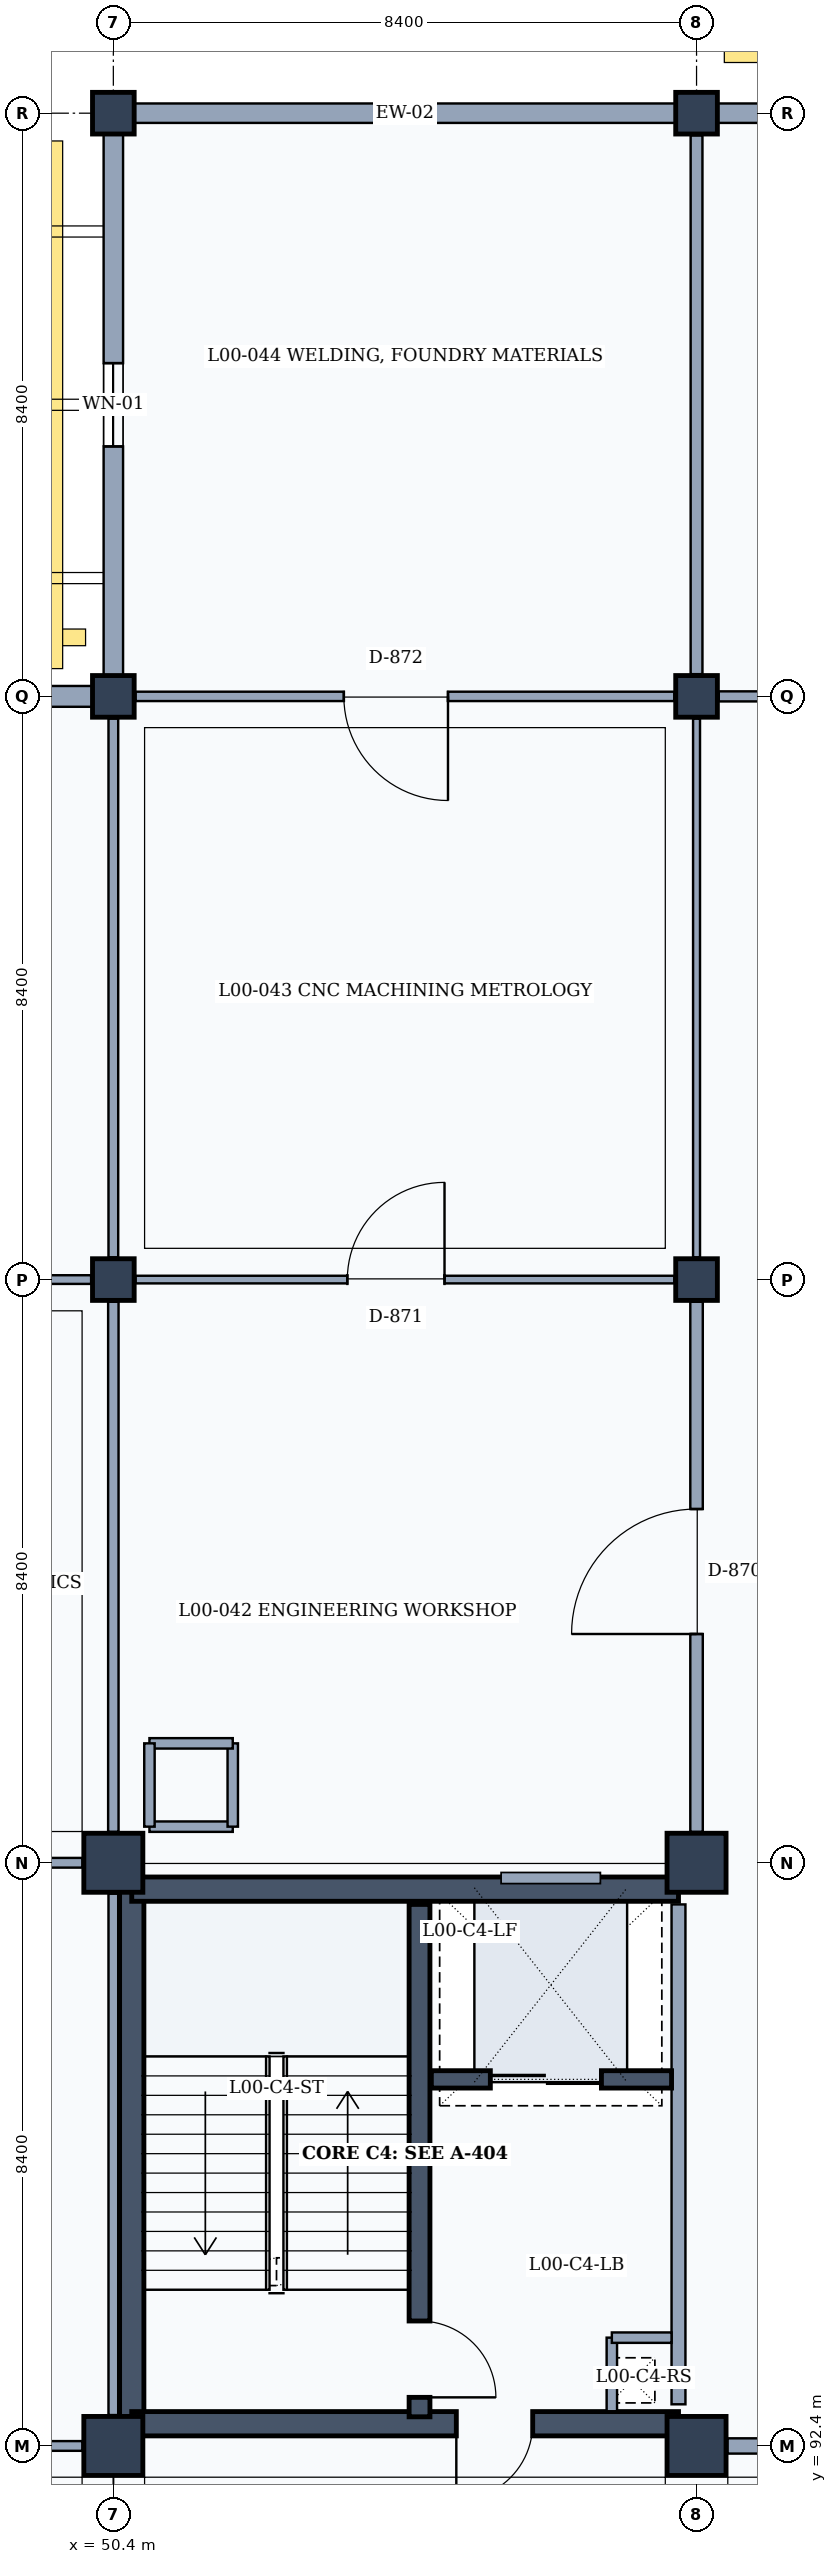
"""IFC4 building model, lengths in metres.
Left out: names, types, materials, properties, quantities, classifications, styles, units other than length and angle.
Written with IfcOpenShell. Run it as: python <this file> out.ifc"""

import sys

from ifc_helpers import new_model, si_unit, direction, frame, frame_2d, origin, origin_2d, place, context, subcontext, project, spatial, rectangle, extrude, element, fill, save


model = new_model("IFC4")
c1 = context("Model", 3, precision=1e-05, world=origin(), true_north=direction((0.0, 1.0)))
c2 = subcontext(c1, "Body", "Model", "MODEL_VIEW")
j1 = project(units=[si_unit("LENGTHUNIT", "METRE"), si_unit("PLANEANGLEUNIT", "RADIAN")], contexts=[c1])
p1 = place(None, origin())
s1 = spatial("IfcSite", under=j1, at=p1, CompositionType="ELEMENT")
p2 = place(p1, origin())
s2 = spatial("IfcBuilding", under=s1, at=p2, CompositionType="ELEMENT")
p3 = place(p2, origin())
s3 = spatial("IfcBuildingStorey", under=s2, at=p3, CompositionType="ELEMENT", Elevation=0.0)
for number, where, z_axis, x_axis in (
    (1, (50.4, 92.4, 0.0), (0.0, 0.0, 1.0), (1.0, 0.0, 0.0)),
    (2, (50.4, 100.8, 0.0), (0.0, 0.0, 1.0), (1.0, 0.0, 0.0)),
):
    element("IfcColumn", number, at=place(p3, frame(where, z_axis=z_axis, x_axis=x_axis)), inside=s3, PredefinedType="COLUMN", context=c2, shape_type="SweptSolid", body=[
        extrude(rectangle(XDim=0.85, YDim=0.85, at=origin_2d()), origin(), (0.0, 0.0, 1.0), 4.8),
    ])
for number, where, z_axis, x_axis in (
    (3, (50.4, 109.2, 0.0), (0.0, 0.0, 1.0), (1.0, 0.0, 0.0)),
    (4, (50.4, 117.6, 0.0), (0.0, 0.0, 1.0), (1.0, 0.0, 0.0)),
    (5, (50.4, 126.0, 0.0), (0.0, 0.0, 1.0), (1.0, 0.0, 0.0)),
):
    element("IfcColumn", number, at=place(p3, frame(where, z_axis=z_axis, x_axis=x_axis)), inside=s3, PredefinedType="COLUMN", context=c2, shape_type="SweptSolid", body=[
        extrude(rectangle(XDim=0.6, YDim=0.6, at=origin_2d()), origin(), (0.0, 0.0, 1.0), 4.8),
    ])
for number, where, z_axis, x_axis in (
    (6, (58.8, 92.4, 0.0), (0.0, 0.0, 1.0), (1.0, 0.0, 0.0)),
    (7, (58.8, 100.8, 0.0), (0.0, 0.0, 1.0), (1.0, 0.0, 0.0)),
):
    element("IfcColumn", number, at=place(p3, frame(where, z_axis=z_axis, x_axis=x_axis)), inside=s3, PredefinedType="COLUMN", context=c2, shape_type="SweptSolid", body=[
        extrude(rectangle(XDim=0.85, YDim=0.85, at=origin_2d()), origin(), (0.0, 0.0, 1.0), 4.8),
    ])
for number, where, z_axis, x_axis in (
    (8, (58.8, 109.2, 0.0), (0.0, 0.0, 1.0), (1.0, 0.0, 0.0)),
    (9, (58.8, 117.6, 0.0), (0.0, 0.0, 1.0), (1.0, 0.0, 0.0)),
    (10, (58.8, 126.0, 0.0), (0.0, 0.0, 1.0), (1.0, 0.0, 0.0)),
):
    element("IfcColumn", number, at=place(p3, frame(where, z_axis=z_axis, x_axis=x_axis)), inside=s3, PredefinedType="COLUMN", context=c2, shape_type="SweptSolid", body=[
        extrude(rectangle(XDim=0.6, YDim=0.6, at=origin_2d()), origin(), (0.0, 0.0, 1.0), 4.8),
    ])
p4 = place(p3, frame((42.25, 117.6, 0.0), z_axis=(0.0, 0.0, 1.0), x_axis=(1.0, 0.0, 0.0)))
e11 = element("IfcWall", 11, at=p4, inside=s3, PredefinedType="SOLIDWALL", context=c2, shape_type="SweptSolid", body=[
    extrude(rectangle(XDim=7.85, YDim=0.3, at=frame_2d((3.925, 0.0))), origin(), (0.0, 0.0, 1.0), 3.96),
])
p5 = place(p4, frame((2.525, 0.0, 0.95)))
e12 = element("IfcOpeningElement", 12, at=p5, cuts=e11, PredefinedType="OPENING", context=c2, shape_type="SweptSolid", body=[
    extrude(rectangle(XDim=2.8, YDim=1.65, at=frame_2d((1.4, 0.825))), frame((0.0, 0.16, 0.0), z_axis=(0.0, -1.0, 0.0), x_axis=(1.0, 0.0, 0.0)), (0.0, 0.0, 1.0), 0.32),
])
p6 = place(p3, frame((50.7, 126.0, 0.0), z_axis=(0.0, 0.0, 1.0), x_axis=(1.0, 0.0, 0.0)))
e13 = element("IfcWall", 13, at=p6, inside=s3, PredefinedType="SOLIDWALL", context=c2, shape_type="SweptSolid", body=[
    extrude(rectangle(XDim=7.8, YDim=0.28, at=frame_2d((3.9, 0.0))), origin(), (0.0, 0.0, 1.0), 3.96),
])
p7 = place(p3, frame((50.4, 117.9, 0.0), z_axis=(0.0, 0.0, 1.0), x_axis=(0.0, 1.0, 0.0)))
e14 = element("IfcWall", 14, at=p7, inside=s3, PredefinedType="SOLIDWALL", context=c2, shape_type="SweptSolid", body=[
    extrude(rectangle(XDim=7.8, YDim=0.28, at=frame_2d((3.9, 0.0))), origin(), (0.0, 0.0, 1.0), 3.96),
])
p8 = place(p7, frame((3.3, 0.0, 0.95)))
e15 = element("IfcOpeningElement", 15, at=p8, cuts=e14, PredefinedType="OPENING", context=c2, shape_type="SweptSolid", body=[
    extrude(rectangle(XDim=1.2, YDim=1.8, at=frame_2d((0.6, 0.9))), frame((0.0, 0.15, 0.0), z_axis=(0.0, -1.0, 0.0), x_axis=(1.0, 0.0, 0.0)), (0.0, 0.0, 1.0), 0.3),
])
p9 = place(p3, frame((59.1, 126.0, 0.0), z_axis=(0.0, 0.0, 1.0), x_axis=(1.0, 0.0, 0.0)))
e16 = element("IfcWall", 16, at=p9, inside=s3, PredefinedType="SOLIDWALL", context=c2, shape_type="SweptSolid", body=[
    extrude(rectangle(XDim=7.8, YDim=0.28, at=frame_2d((3.9, 0.0))), origin(), (0.0, 0.0, 1.0), 3.96),
])
p10 = place(p9, frame((3.1, 0.0, 0.95)))
e17 = element("IfcOpeningElement", 17, at=p10, cuts=e16, PredefinedType="OPENING", context=c2, shape_type="SweptSolid", body=[
    extrude(rectangle(XDim=1.6, YDim=2.0, at=frame_2d((0.8, 1.0))), frame((0.0, 0.15, 0.0), z_axis=(0.0, -1.0, 0.0), x_axis=(1.0, 0.0, 0.0)), (0.0, 0.0, 1.0), 0.3),
])
p11 = place(p3, frame((50.665, 92.65, 0.0), z_axis=(0.0, 0.0, 1.0), x_axis=(0.0, 1.0, 0.0)))
e18 = element("IfcWall", 18, at=p11, inside=s3, PredefinedType="SHEAR", context=c2, shape_type="SweptSolid", body=[
    extrude(rectangle(XDim=7.94, YDim=0.35, at=frame_2d((3.97, 0.0))), origin(), (0.0, 0.0, 1.0), 4.54),
])
p12 = place(p3, frame((50.665, 100.42, 0.0), z_axis=(0.0, 0.0, 1.0), x_axis=(1.0, 0.0, 0.0)))
e19 = element("IfcWall", 19, at=p12, inside=s3, PredefinedType="SHEAR", context=c2, shape_type="SweptSolid", body=[
    extrude(rectangle(XDim=7.875, YDim=0.35, at=frame_2d((3.938, 0.0))), origin(), (0.0, 0.0, 1.0), 4.54),
])
p13 = place(p3, frame((58.54, 100.2, 0.0), z_axis=(0.0, 0.0, 1.0), x_axis=(0.0, -1.0, 0.0)))
e20 = element("IfcWall", 20, at=p13, inside=s3, PredefinedType="PARTITIONING", context=c2, shape_type="SweptSolid", body=[
    extrude(rectangle(XDim=7.2, YDim=0.2, at=frame_2d((3.6, 0.0))), origin(), (0.0, 0.0, 1.0), 3.92),
])
p14 = place(p3, frame((58.54, 92.72, 0.0), z_axis=(0.0, 0.0, 1.0), x_axis=(-1.0, 0.0, 0.0)))
e21 = element("IfcWall", 21, at=p14, inside=s3, PredefinedType="SHEAR", context=c2, shape_type="SweptSolid", body=[
    extrude(rectangle(XDim=7.875, YDim=0.35, at=frame_2d((3.938, 0.0))), origin(), (0.0, 0.0, 1.0), 4.54),
])
p15 = place(p14, frame((2.1, 0.0, 0.0)))
e22 = element("IfcOpeningElement", 22, at=p15, cuts=e21, PredefinedType="OPENING", context=c2, shape_type="SweptSolid", body=[
    extrude(rectangle(XDim=1.1, YDim=2.15, at=frame_2d((0.55, 1.075))), frame((0.0, 0.185, 0.0), z_axis=(0.0, -1.0, 0.0), x_axis=(1.0, 0.0, 0.0)), (0.0, 0.0, 1.0), 0.37),
])
p16 = place(p3, frame((54.81, 92.82, 0.0), z_axis=(0.0, 0.0, 1.0), x_axis=(0.0, 1.0, 0.0)))
e23 = element("IfcWall", 23, at=p16, inside=s3, PredefinedType="SHEAR", context=c2, shape_type="SweptSolid", body=[
    extrude(rectangle(XDim=7.38, YDim=0.3, at=frame_2d((3.69, 0.0))), origin(), (0.0, 0.0, 1.0), 4.54),
])
p17 = place(p16, frame((0.28, 0.0, 0.0)))
e24 = element("IfcOpeningElement", 24, at=p17, cuts=e23, PredefinedType="OPENING", context=c2, shape_type="SweptSolid", body=[
    extrude(rectangle(XDim=1.1, YDim=2.15, at=frame_2d((0.55, 1.075))), frame((0.0, 0.16, 0.0), z_axis=(0.0, -1.0, 0.0), x_axis=(1.0, 0.0, 0.0)), (0.0, 0.0, 1.0), 0.32),
])
p18 = place(p3, frame((57.58, 93.96, 0.0), z_axis=(0.0, 0.0, 1.0), x_axis=(0.0, -1.0, 0.0)))
e25 = element("IfcWall", 25, at=p18, inside=s3, PredefinedType="PARTITIONING", context=c2, shape_type="SweptSolid", body=[
    extrude(rectangle(XDim=1.06, YDim=0.15, at=frame_2d((0.53, 0.0))), origin(), (0.0, 0.0, 1.0), 3.92),
])
p19 = place(p3, frame((57.58, 93.96, 0.0), z_axis=(0.0, 0.0, 1.0), x_axis=(1.0, 0.0, 0.0)))
e26 = element("IfcWall", 26, at=p19, inside=s3, PredefinedType="PARTITIONING", context=c2, shape_type="SweptSolid", body=[
    extrude(rectangle(XDim=0.86, YDim=0.15, at=frame_2d((0.43, 0.0))), origin(), (0.0, 0.0, 1.0), 3.92),
])
p20 = place(p3, frame((54.98, 97.68, 0.0), z_axis=(0.0, 0.0, 1.0), x_axis=(1.0, 0.0, 0.0)))
e27 = element("IfcWall", 27, at=p20, inside=s3, PredefinedType="SHEAR", context=c2, shape_type="SweptSolid", body=[
    extrude(rectangle(XDim=3.46, YDim=0.25, at=frame_2d((1.73, 0.0))), origin(), (0.0, 0.0, 1.0), 4.54),
])
p21 = place(p20, frame((0.85, 0.0, 0.0)))
e28 = element("IfcOpeningElement", 28, at=p21, cuts=e27, PredefinedType="OPENING", context=c2, shape_type="SweptSolid", body=[
    extrude(rectangle(XDim=1.6, YDim=2.3, at=frame_2d((0.8, 1.15))), frame((0.0, 0.135, 0.0), z_axis=(0.0, -1.0, 0.0), x_axis=(1.0, 0.0, 0.0)), (0.0, 0.0, 1.0), 0.27),
])
p22 = place(p3, frame((50.92, 101.32, 0.0), z_axis=(0.0, 0.0, 1.0), x_axis=(1.0, 0.0, 0.0)))
e29 = element("IfcWall", 29, at=p22, inside=s3, PredefinedType="PARTITIONING", context=c2, shape_type="SweptSolid", body=[
    extrude(rectangle(XDim=1.2, YDim=0.15, at=frame_2d((0.6, 0.0))), origin(), (0.0, 0.0, 1.0), 4.54),
])
p23 = place(p3, frame((52.12, 101.32, 0.0), z_axis=(0.0, 0.0, 1.0), x_axis=(0.0, 1.0, 0.0)))
e30 = element("IfcWall", 30, at=p23, inside=s3, PredefinedType="PARTITIONING", context=c2, shape_type="SweptSolid", body=[
    extrude(rectangle(XDim=1.2, YDim=0.15, at=frame_2d((0.6, 0.0))), origin(), (0.0, 0.0, 1.0), 4.54),
])
p24 = place(p3, frame((52.12, 102.52, 0.0), z_axis=(0.0, 0.0, 1.0), x_axis=(-1.0, 0.0, 0.0)))
e31 = element("IfcWall", 31, at=p24, inside=s3, PredefinedType="PARTITIONING", context=c2, shape_type="SweptSolid", body=[
    extrude(rectangle(XDim=1.2, YDim=0.15, at=frame_2d((0.6, 0.0))), origin(), (0.0, 0.0, 1.0), 4.54),
])
p25 = place(p3, frame((50.92, 102.52, 0.0), z_axis=(0.0, 0.0, 1.0), x_axis=(0.0, -1.0, 0.0)))
e32 = element("IfcWall", 32, at=p25, inside=s3, PredefinedType="PARTITIONING", context=c2, shape_type="SweptSolid", body=[
    extrude(rectangle(XDim=1.2, YDim=0.15, at=frame_2d((0.6, 0.0))), origin(), (0.0, 0.0, 1.0), 4.54),
])
p26 = place(p3, frame((42.27, 92.4, 0.0), z_axis=(0.0, 0.0, 1.0), x_axis=(1.0, 0.0, 0.0)))
e33 = element("IfcWall", 33, at=p26, inside=s3, PredefinedType="PARTITIONING", context=c2, shape_type="SweptSolid", body=[
    extrude(rectangle(XDim=7.685, YDim=0.14, at=frame_2d((3.843, 0.0))), origin(), (0.0, 0.0, 1.0), 3.86),
])
p27 = place(p26, frame((3.275, 0.0, 0.0)))
e34 = element("IfcOpeningElement", 34, at=p27, cuts=e33, PredefinedType="OPENING", context=c2, shape_type="SweptSolid", body=[
    extrude(rectangle(XDim=0.95, YDim=2.15, at=frame_2d((0.475, 1.075))), frame((0.0, 0.08, 0.0), z_axis=(0.0, -1.0, 0.0), x_axis=(1.0, 0.0, 0.0)), (0.0, 0.0, 1.0), 0.16),
])
p28 = place(p3, frame((50.4, 92.845, 0.0), z_axis=(0.0, 0.0, 1.0), x_axis=(0.0, 1.0, 0.0)))
e35 = element("IfcWall", 35, at=p28, inside=s3, PredefinedType="PARTITIONING", context=c2, shape_type="SweptSolid", body=[
    extrude(rectangle(XDim=7.51, YDim=0.14, at=frame_2d((3.755, 0.0))), origin(), (0.0, 0.0, 1.0), 3.92),
])
p29 = place(p3, frame((42.27, 100.8, 0.0), z_axis=(0.0, 0.0, 1.0), x_axis=(1.0, 0.0, 0.0)))
e36 = element("IfcWall", 36, at=p29, inside=s3, PredefinedType="PARTITIONING", context=c2, shape_type="SweptSolid", body=[
    extrude(rectangle(XDim=7.685, YDim=0.14, at=frame_2d((3.843, 0.0))), origin(), (0.0, 0.0, 1.0), 3.86),
])
p30 = place(p3, frame((50.4, 101.245, 0.0), z_axis=(0.0, 0.0, 1.0), x_axis=(0.0, 1.0, 0.0)))
e37 = element("IfcWall", 37, at=p30, inside=s3, PredefinedType="PARTITIONING", context=c2, shape_type="SweptSolid", body=[
    extrude(rectangle(XDim=7.635, YDim=0.15, at=frame_2d((3.817, 0.0))), origin(), (0.0, 0.0, 1.0), 3.92),
])
p31 = place(p3, frame((42.27, 109.2, 0.0), z_axis=(0.0, 0.0, 1.0), x_axis=(1.0, 0.0, 0.0)))
e38 = element("IfcWall", 38, at=p31, inside=s3, PredefinedType="PARTITIONING", context=c2, shape_type="SweptSolid", body=[
    extrude(rectangle(XDim=7.81, YDim=0.125, at=frame_2d((3.905, 0.0))), origin(), (0.0, 0.0, 1.0), 3.86),
])
p32 = place(p31, frame((3.275, 0.0, 0.0)))
e39 = element("IfcOpeningElement", 39, at=p32, cuts=e38, PredefinedType="OPENING", context=c2, shape_type="SweptSolid", body=[
    extrude(rectangle(XDim=0.95, YDim=2.15, at=frame_2d((0.475, 1.075))), frame((0.0, 0.073, 0.0), z_axis=(0.0, -1.0, 0.0), x_axis=(1.0, 0.0, 0.0)), (0.0, 0.0, 1.0), 0.145),
])
p33 = place(p3, frame((50.4, 109.52, 0.0), z_axis=(0.0, 0.0, 1.0), x_axis=(0.0, 1.0, 0.0)))
e40 = element("IfcWall", 40, at=p33, inside=s3, PredefinedType="PARTITIONING", context=c2, shape_type="SweptSolid", body=[
    extrude(rectangle(XDim=7.76, YDim=0.14, at=frame_2d((3.88, 0.0))), origin(), (0.0, 0.0, 1.0), 3.92),
])
p34 = place(p3, frame((58.8, 101.245, 0.0), z_axis=(0.0, 0.0, 1.0), x_axis=(0.0, 1.0, 0.0)))
e41 = element("IfcWall", 41, at=p34, inside=s3, PredefinedType="PARTITIONING", context=c2, shape_type="SweptSolid", body=[
    extrude(rectangle(XDim=7.635, YDim=0.18, at=frame_2d((3.817, 0.0))), origin(), (0.0, 0.0, 1.0), 3.92),
])
p35 = place(p34, frame((2.85, 0.0, 0.0)))
e42 = element("IfcOpeningElement", 42, at=p35, cuts=e41, PredefinedType="OPENING", context=c2, shape_type="SweptSolid", body=[
    extrude(rectangle(XDim=1.8, YDim=2.3, at=frame_2d((0.9, 1.15))), frame((0.0, 0.1, 0.0), z_axis=(0.0, -1.0, 0.0), x_axis=(1.0, 0.0, 0.0)), (0.0, 0.0, 1.0), 0.2),
])
p36 = place(p3, frame((50.72, 109.2, 0.0), z_axis=(0.0, 0.0, 1.0), x_axis=(1.0, 0.0, 0.0)))
e43 = element("IfcWall", 43, at=p36, inside=s3, PredefinedType="PARTITIONING", context=c2, shape_type="SweptSolid", body=[
    extrude(rectangle(XDim=7.76, YDim=0.11, at=frame_2d((3.88, 0.0))), origin(), (0.0, 0.0, 1.0), 3.92),
])
p37 = place(p36, frame((3.05, 0.0, 0.0)))
e44 = element("IfcOpeningElement", 44, at=p37, cuts=e43, PredefinedType="OPENING", context=c2, shape_type="SweptSolid", body=[
    extrude(rectangle(XDim=1.4, YDim=2.25, at=frame_2d((0.7, 1.125))), frame((0.0, 0.065, 0.0), z_axis=(0.0, -1.0, 0.0), x_axis=(1.0, 0.0, 0.0)), (0.0, 0.0, 1.0), 0.13),
])
p38 = place(p3, frame((58.8, 109.52, 0.0), z_axis=(0.0, 0.0, 1.0), x_axis=(0.0, 1.0, 0.0)))
e45 = element("IfcWall", 45, at=p38, inside=s3, PredefinedType="MOVABLE", context=c2, shape_type="SweptSolid", body=[
    extrude(rectangle(XDim=7.76, YDim=0.1, at=frame_2d((3.88, 0.0))), origin(), (0.0, 0.0, 1.0), 3.92),
])
p39 = place(p3, frame((50.72, 117.6, 0.0), z_axis=(0.0, 0.0, 1.0), x_axis=(1.0, 0.0, 0.0)))
e46 = element("IfcWall", 46, at=p39, inside=s3, PredefinedType="PARTITIONING", context=c2, shape_type="SweptSolid", body=[
    extrude(rectangle(XDim=7.76, YDim=0.135, at=frame_2d((3.88, 0.0))), origin(), (0.0, 0.0, 1.0), 3.92),
])
p40 = place(p39, frame((3.0, 0.0, 0.0)))
e47 = element("IfcOpeningElement", 47, at=p40, cuts=e46, PredefinedType="OPENING", context=c2, shape_type="SweptSolid", body=[
    extrude(rectangle(XDim=1.5, YDim=2.3, at=frame_2d((0.75, 1.15))), frame((0.0, 0.077, 0.0), z_axis=(0.0, -1.0, 0.0), x_axis=(1.0, 0.0, 0.0)), (0.0, 0.0, 1.0), 0.155),
])
p41 = place(p3, frame((58.8, 117.92, 0.0), z_axis=(0.0, 0.0, 1.0), x_axis=(0.0, 1.0, 0.0)))
e48 = element("IfcWall", 48, at=p41, inside=s3, PredefinedType="PARTITIONING", context=c2, shape_type="SweptSolid", body=[
    extrude(rectangle(XDim=7.76, YDim=0.17, at=frame_2d((3.88, 0.0))), origin(), (0.0, 0.0, 1.0), 3.92),
])
p42 = place(p3, frame((59.245, 92.4, 0.0), z_axis=(0.0, 0.0, 1.0), x_axis=(1.0, 0.0, 0.0)))
e49 = element("IfcWall", 49, at=p42, inside=s3, PredefinedType="PARTITIONING", context=c2, shape_type="SweptSolid", body=[
    extrude(rectangle(XDim=7.635, YDim=0.22, at=frame_2d((3.817, 0.0))), origin(), (0.0, 0.0, 1.0), 3.92),
])
p43 = place(p42, frame((2.85, 0.0, 0.0)))
e50 = element("IfcOpeningElement", 50, at=p43, cuts=e49, PredefinedType="OPENING", context=c2, shape_type="SweptSolid", body=[
    extrude(rectangle(XDim=1.8, YDim=2.3, at=frame_2d((0.9, 1.15))), frame((0.0, 0.12, 0.0), z_axis=(0.0, -1.0, 0.0), x_axis=(1.0, 0.0, 0.0)), (0.0, 0.0, 1.0), 0.24),
])
p44 = place(p3, frame((59.12, 117.6, 0.0), z_axis=(0.0, 0.0, 1.0), x_axis=(1.0, 0.0, 0.0)))
e51 = element("IfcWall", 51, at=p44, inside=s3, PredefinedType="PARTITIONING", context=c2, shape_type="SweptSolid", body=[
    extrude(rectangle(XDim=7.76, YDim=0.145, at=frame_2d((3.88, 0.0))), origin(), (0.0, 0.0, 1.0), 3.92),
])
p45 = place(p44, frame((2.85, 0.0, 0.0)))
e52 = element("IfcOpeningElement", 52, at=p45, cuts=e51, PredefinedType="OPENING", context=c2, shape_type="SweptSolid", body=[
    extrude(rectangle(XDim=1.8, YDim=2.3, at=frame_2d((0.9, 1.15))), frame((0.0, 0.083, 0.0), z_axis=(0.0, -1.0, 0.0), x_axis=(1.0, 0.0, 0.0)), (0.0, 0.0, 1.0), 0.165),
])
p46 = place(p8, origin())
e53 = element("IfcWindow", 53, at=p46, inside=s3, PartitioningType="SINGLE_PANEL", PredefinedType="WINDOW", context=c2, shape_type="SweptSolid", body=[
    extrude(rectangle(XDim=1.2, YDim=1.8, at=frame_2d((0.6, 0.9))), frame((0.0, 0.03, 0.0), z_axis=(0.0, -1.0, 0.0), x_axis=(1.0, 0.0, 0.0)), (0.0, 0.0, 1.0), 0.06),
])
fill(e15, e53)
p47 = place(p15, origin())
e54 = element("IfcDoor", 54, at=p47, inside=s3, OperationType="SINGLE_SWING_RIGHT", PredefinedType="DOOR", context=c2, shape_type="SweptSolid", body=[
    extrude(rectangle(XDim=1.1, YDim=2.15, at=frame_2d((0.55, 1.075))), frame((0.0, 0.025, 0.0), z_axis=(0.0, -1.0, 0.0), x_axis=(1.0, 0.0, 0.0)), (0.0, 0.0, 1.0), 0.05),
])
fill(e22, e54)
p48 = place(p17, frame((1.1, 0.0, 0.0), z_axis=(0.0, 0.0, 1.0), x_axis=(-1.0, 0.0, 0.0)))
e55 = element("IfcDoor", 55, at=p48, inside=s3, OperationType="SINGLE_SWING_RIGHT", PredefinedType="DOOR", context=c2, shape_type="SweptSolid", body=[
    extrude(rectangle(XDim=1.1, YDim=2.15, at=frame_2d((0.55, 1.075))), frame((0.0, 0.025, 0.0), z_axis=(0.0, -1.0, 0.0), x_axis=(1.0, 0.0, 0.0)), (0.0, 0.0, 1.0), 0.05),
])
fill(e24, e55)
p49 = place(p21, origin())
e56 = element("IfcDoor", 56, at=p49, inside=s3, OperationType="DOUBLE_DOOR_SLIDING", PredefinedType="DOOR", context=c2, shape_type="SweptSolid", body=[
    extrude(rectangle(XDim=1.6, YDim=2.3, at=frame_2d((0.8, 1.15))), frame((0.0, 0.025, 0.0), z_axis=(0.0, -1.0, 0.0), x_axis=(1.0, 0.0, 0.0)), (0.0, 0.0, 1.0), 0.05),
])
fill(e28, e56)
p50 = place(p35, origin())
e57 = element("IfcDoor", 57, at=p50, inside=s3, OperationType="SINGLE_SWING_LEFT", PredefinedType="DOOR", context=c2, shape_type="SweptSolid", body=[
    extrude(rectangle(XDim=1.8, YDim=2.3, at=frame_2d((0.9, 1.15))), frame((0.0, 0.025, 0.0), z_axis=(0.0, -1.0, 0.0), x_axis=(1.0, 0.0, 0.0)), (0.0, 0.0, 1.0), 0.05),
])
fill(e42, e57)
p51 = place(p37, origin())
e58 = element("IfcDoor", 58, at=p51, inside=s3, OperationType="SINGLE_SWING_RIGHT", PredefinedType="DOOR", context=c2, shape_type="SweptSolid", body=[
    extrude(rectangle(XDim=1.4, YDim=2.25, at=frame_2d((0.7, 1.125))), frame((0.0, 0.025, 0.0), z_axis=(0.0, -1.0, 0.0), x_axis=(1.0, 0.0, 0.0)), (0.0, 0.0, 1.0), 0.05),
])
fill(e44, e58)
p52 = place(p40, frame((1.5, 0.0, 0.0), z_axis=(0.0, 0.0, 1.0), x_axis=(-1.0, 0.0, 0.0)))
e59 = element("IfcDoor", 59, at=p52, inside=s3, OperationType="SINGLE_SWING_LEFT", PredefinedType="DOOR", context=c2, shape_type="SweptSolid", body=[
    extrude(rectangle(XDim=1.5, YDim=2.3, at=frame_2d((0.75, 1.15))), frame((0.0, 0.025, 0.0), z_axis=(0.0, -1.0, 0.0), x_axis=(1.0, 0.0, 0.0)), (0.0, 0.0, 1.0), 0.05),
])
fill(e47, e59)
save(model, sys.argv[1])
